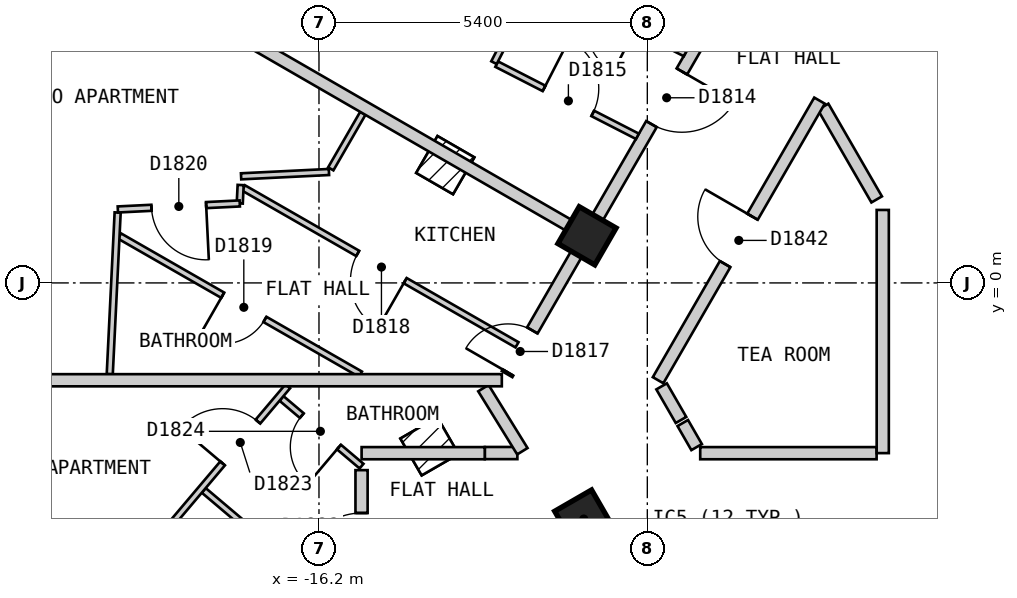
"""IFC4 building model, lengths in metres.
Left out: names, types, materials, properties, quantities, classifications, styles, units other than length and angle.
Written with IfcOpenShell. Run it as: python <this file> out.ifc"""

import sys

from ifc_helpers import new_model, si_unit, direction, frame, frame_2d, origin, origin_2d, place, context, subcontext, project, spatial, polyline, rectangle, outline, extrude, element, fill, save


model = new_model("IFC4")
c1 = context("Model", 3, precision=1e-05, world=origin(), true_north=direction((0.0, 1.0)))
c2 = subcontext(c1, "Body", "Model", "MODEL_VIEW")
j1 = project(units=[si_unit("LENGTHUNIT", "METRE"), si_unit("PLANEANGLEUNIT", "RADIAN")], contexts=[c1])
p1 = place(None, origin())
s1 = spatial("IfcSite", under=j1, at=p1, CompositionType="ELEMENT")
p2 = place(p1, origin())
s2 = spatial("IfcBuilding", under=s1, at=p2, CompositionType="ELEMENT")
p3 = place(p2, frame((0.0, 0.0, 202.8)))
s3 = spatial("IfcBuildingStorey", under=s2, at=p3, CompositionType="ELEMENT", Elevation=202.8)
for number, where, z_axis, x_axis in (
    (1, (-11.845, -3.883, 0.0), (0.0, 0.0, 1.0), (0.5, -0.866, 0.0)),
    (2, (-11.792, 0.775, 0.0), (0.0, 0.0, 1.0), (-0.5, -0.866, 0.0)),
):
    element("IfcColumn", number, at=place(p3, frame(where, z_axis=z_axis, x_axis=x_axis)), inside=s3, PredefinedType="COLUMN", context=c2, shape_type="SweptSolid", body=[
        extrude(rectangle(XDim=0.7, YDim=0.7, at=origin_2d()), origin(), (0.0, 0.0, 1.0), 3.0),
    ])
p4 = place(p3, frame((-12.514, 20.025, 0.0), z_axis=(0.0, 0.0, 1.0), x_axis=(-0.500003656944, -0.866023292436, 0.0)))
e3 = element("IfcWall", 3, at=p4, inside=s3, PredefinedType="SOLIDWALL", context=c2, shape_type="SweptSolid", body=[
    extrude(outline(polyline([(0.0, -0.15), (22.17, -0.15), (22.09, 0.15), (0.08, 0.15), (0.0, -0.15)])), origin(), (0.0, 0.0, 1.0), 2.7),
])
p5 = place(p4, frame((1.191, 0.0, 0.15)))
e4 = element("IfcOpeningElement", 4, at=p5, cuts=e3, PredefinedType="OPENING", context=c2, shape_type="SweptSolid", body=[
    extrude(rectangle(XDim=1.5, YDim=2.1, at=frame_2d((0.75, 1.05))), frame((0.0, 0.16, 0.0), z_axis=(0.0, -1.0, 0.0), x_axis=(1.0, 0.0, 0.0)), (0.0, 0.0, 1.0), 0.32),
])
p6 = place(p4, frame((3.804, 0.0, 0.15)))
e5 = element("IfcOpeningElement", 5, at=p6, cuts=e3, PredefinedType="OPENING", context=c2, shape_type="SweptSolid", body=[
    extrude(rectangle(XDim=1.5, YDim=2.1, at=frame_2d((0.75, 1.05))), frame((0.0, 0.16, 0.0), z_axis=(0.0, -1.0, 0.0), x_axis=(1.0, 0.0, 0.0)), (0.0, 0.0, 1.0), 0.32),
])
p7 = place(p4, frame((6.416, 0.0, 0.15)))
e6 = element("IfcOpeningElement", 6, at=p7, cuts=e3, PredefinedType="OPENING", context=c2, shape_type="SweptSolid", body=[
    extrude(rectangle(XDim=1.5, YDim=2.1, at=frame_2d((0.75, 1.05))), frame((0.0, 0.16, 0.0), z_axis=(0.0, -1.0, 0.0), x_axis=(1.0, 0.0, 0.0)), (0.0, 0.0, 1.0), 0.32),
])
p8 = place(p4, frame((9.029, 0.0, 0.15)))
e7 = element("IfcOpeningElement", 7, at=p8, cuts=e3, PredefinedType="OPENING", context=c2, shape_type="SweptSolid", body=[
    extrude(rectangle(XDim=1.5, YDim=2.1, at=frame_2d((0.75, 1.05))), frame((0.0, 0.16, 0.0), z_axis=(0.0, -1.0, 0.0), x_axis=(1.0, 0.0, 0.0)), (0.0, 0.0, 1.0), 0.32),
])
p9 = place(p4, frame((11.641, 0.0, 0.15)))
e8 = element("IfcOpeningElement", 8, at=p9, cuts=e3, PredefinedType="OPENING", context=c2, shape_type="SweptSolid", body=[
    extrude(rectangle(XDim=1.5, YDim=2.1, at=frame_2d((0.75, 1.05))), frame((0.0, 0.16, 0.0), z_axis=(0.0, -1.0, 0.0), x_axis=(1.0, 0.0, 0.0)), (0.0, 0.0, 1.0), 0.32),
])
p10 = place(p4, frame((14.254, 0.0, 0.15)))
e9 = element("IfcOpeningElement", 9, at=p10, cuts=e3, PredefinedType="OPENING", context=c2, shape_type="SweptSolid", body=[
    extrude(rectangle(XDim=1.5, YDim=2.1, at=frame_2d((0.75, 1.05))), frame((0.0, 0.16, 0.0), z_axis=(0.0, -1.0, 0.0), x_axis=(1.0, 0.0, 0.0)), (0.0, 0.0, 1.0), 0.32),
])
p11 = place(p4, frame((16.866, 0.0, 0.15)))
e10 = element("IfcOpeningElement", 10, at=p11, cuts=e3, PredefinedType="OPENING", context=c2, shape_type="SweptSolid", body=[
    extrude(rectangle(XDim=1.5, YDim=2.1, at=frame_2d((0.75, 1.05))), frame((0.0, 0.16, 0.0), z_axis=(0.0, -1.0, 0.0), x_axis=(1.0, 0.0, 0.0)), (0.0, 0.0, 1.0), 0.32),
])
p12 = place(p4, frame((19.479, 0.0, 0.15)))
e11 = element("IfcOpeningElement", 11, at=p12, cuts=e3, PredefinedType="OPENING", context=c2, shape_type="SweptSolid", body=[
    extrude(rectangle(XDim=1.5, YDim=2.1, at=frame_2d((0.75, 1.05))), frame((0.0, 0.16, 0.0), z_axis=(0.0, -1.0, 0.0), x_axis=(1.0, 0.0, 0.0)), (0.0, 0.0, 1.0), 0.32),
])
p13 = place(p3, frame((-15.652, -21.037, 0.0), z_axis=(0.0, 0.0, 1.0), x_axis=(-0.500074253024, 0.865982529536, 0.0)))
e12 = element("IfcWall", 12, at=p13, inside=s3, PredefinedType="PARAPET", context=c2, shape_type="SweptSolid", body=[
    extrude(outline(polyline([(0.067, -0.125), (20.718, -0.125), (20.784, 0.125), (0.0, 0.125), (0.067, -0.125)])), origin(), (0.0, 0.0, 1.0), 1.6),
])
p14 = place(p3, frame((-26.046, 1.838, 0.0), z_axis=(0.0, 0.0, 1.0), x_axis=(0.500061067893, 0.865990143349, 0.0)))
e13 = element("IfcWall", 13, at=p14, inside=s3, PredefinedType="PARAPET", context=c2, shape_type="SweptSolid", body=[
    extrude(outline(polyline([(0.067, -0.125), (22.796, -0.125), (22.863, 0.125), (0.0, 0.125), (0.067, -0.125)])), origin(), (0.0, 0.0, 1.0), 1.6),
])
p15 = place(p3, frame((-7.909, 2.898, 0.0), z_axis=(0.0, 0.0, 1.0), x_axis=(0.50019444547, -0.865913111531, 0.0)))
e14 = element("IfcWall", 14, at=p15, inside=s3, PredefinedType="PARTITIONING", context=c2, shape_type="SweptSolid", body=[
    extrude(rectangle(XDim=1.761, YDim=0.2, at=frame_2d((0.88, 0.0))), origin(), (0.0, 0.0, 1.0), 2.7),
])
p16 = place(p3, frame((-10.565, -1.701, 0.0), z_axis=(0.0, 0.0, 1.0), x_axis=(0.499512735409, -0.866306543416, 0.0)))
e15 = element("IfcWall", 15, at=p16, inside=s3, PredefinedType="PARTITIONING", context=c2, shape_type="SweptSolid", body=[
    extrude(rectangle(XDim=0.638, YDim=0.2, at=frame_2d((0.319, 0.0))), origin(), (0.0, 0.0, 1.0), 2.7),
])
p17 = place(p3, frame((-10.217, -2.304, 0.0), z_axis=(0.0, 0.0, 1.0), x_axis=(0.499013081552, -0.866594452117, 0.0)))
e16 = element("IfcWall", 16, at=p17, inside=s3, PredefinedType="PARTITIONING", context=c2, shape_type="SweptSolid", body=[
    extrude(rectangle(XDim=0.457, YDim=0.2, at=frame_2d((0.229, 0.0))), origin(), (0.0, 0.0, 1.0), 2.7),
])
p18 = place(p3, frame((-13.472, -2.798, 0.0), z_axis=(0.0, 0.0, 1.0), x_axis=(1.0, 0.0, 0.0)))
e17 = element("IfcWall", 17, at=p18, inside=s3, PredefinedType="PARTITIONING", context=c2, shape_type="SweptSolid", body=[
    extrude(rectangle(XDim=0.535, YDim=0.2, at=frame_2d((0.268, 0.0))), origin(), (0.0, 0.0, 1.0), 2.7),
])
p19 = place(p3, frame((-15.499, -2.8, 0.0), z_axis=(0.0, 0.0, 1.0), x_axis=(1.0, 0.0, 0.0)))
e18 = element("IfcWall", 18, at=p19, inside=s3, PredefinedType="PARTITIONING", context=c2, shape_type="SweptSolid", body=[
    extrude(rectangle(XDim=2.025, YDim=0.2, at=frame_2d((1.012, 0.0))), origin(), (0.0, 0.0, 1.0), 2.7),
])
p20 = place(p3, frame((-9.93, -2.8, 0.0), z_axis=(0.0, 0.0, 1.0), x_axis=(1.0, 0.0, 0.0)))
e19 = element("IfcWall", 19, at=p20, inside=s3, PredefinedType="PARTITIONING", context=c2, shape_type="SweptSolid", body=[
    extrude(rectangle(XDim=2.901, YDim=0.2, at=frame_2d((1.45, 0.0))), origin(), (0.0, 0.0, 1.0), 2.7),
])
p21 = place(p3, frame((-10.623, -1.6, 0.0), z_axis=(0.0, 0.0, 1.0), x_axis=(0.500040865889, 0.866001808567, 0.0)))
e20 = element("IfcWall", 20, at=p21, inside=s3, PredefinedType="PARTITIONING", context=c2, shape_type="SweptSolid", body=[
    extrude(rectangle(XDim=5.31, YDim=0.2, at=frame_2d((2.655, 0.0))), origin(), (0.0, 0.0, 1.0), 2.7),
])
p22 = place(p21, frame((2.205, 0.0, 0.0)))
e21 = element("IfcOpeningElement", 21, at=p22, cuts=e20, PredefinedType="OPENING", context=c2, shape_type="SweptSolid", body=[
    extrude(rectangle(XDim=0.9, YDim=2.1, at=frame_2d((0.45, 1.05))), frame((0.0, 0.11, 0.0), z_axis=(0.0, -1.0, 0.0), x_axis=(1.0, 0.0, 0.0)), (0.0, 0.0, 1.0), 0.22),
])
p23 = place(p3, frame((-13.106, -1.5, 0.0), z_axis=(0.0, 0.0, 1.0), x_axis=(0.500025705601, 0.86601056214, 0.0)))
e22 = element("IfcWall", 22, at=p23, inside=s3, PredefinedType="PARTITIONING", context=c2, shape_type="SweptSolid", body=[
    extrude(rectangle(XDim=7.735, YDim=0.2, at=frame_2d((3.868, 0.0))), origin(), (0.0, 0.0, 1.0), 2.7),
])
p24 = place(p23, frame((4.748, 0.0, 0.0)))
e23 = element("IfcOpeningElement", 23, at=p24, cuts=e22, PredefinedType="OPENING", context=c2, shape_type="SweptSolid", body=[
    extrude(rectangle(XDim=1.0, YDim=2.1, at=frame_2d((0.5, 1.05))), frame((0.0, 0.11, 0.0), z_axis=(0.0, -1.0, 0.0), x_axis=(1.0, 0.0, 0.0)), (0.0, 0.0, 1.0), 0.22),
])
p25 = place(p23, frame((0.03, 0.0, 0.0)))
e24 = element("IfcOpeningElement", 24, at=p25, cuts=e22, PredefinedType="OPENING", context=c2, shape_type="SweptSolid", body=[
    extrude(rectangle(XDim=0.8, YDim=2.1, at=frame_2d((0.4, 1.05))), frame((0.0, 0.11, 0.0), z_axis=(0.0, -1.0, 0.0), x_axis=(1.0, 0.0, 0.0)), (0.0, 0.0, 1.0), 0.22),
])
p26 = place(p3, frame((-6.928, -2.799, 0.0), z_axis=(0.0, 0.0, 1.0), x_axis=(0.0, 1.0, 0.0)))
e25 = element("IfcWall", 25, at=p26, inside=s3, PredefinedType="PARTITIONING", context=c2, shape_type="SweptSolid", body=[
    extrude(rectangle(XDim=3.999, YDim=0.2, at=frame_2d((2.0, 0.0))), origin(), (0.0, 0.0, 1.0), 2.7),
])
p27 = place(p3, frame((-15.5, -6.599, 0.0), z_axis=(0.0, 0.0, 1.0), x_axis=(0.0, 1.0, 0.0)))
e26 = element("IfcWall", 26, at=p27, inside=s3, PredefinedType="PARTITIONING", context=c2, shape_type="SweptSolid", body=[
    extrude(rectangle(XDim=3.52, YDim=0.2, at=frame_2d((1.76, 0.0))), origin(), (0.0, 0.0, 1.0), 2.7),
])
p28 = place(p27, frame((1.815, 0.0, 0.0)))
e27 = element("IfcOpeningElement", 27, at=p28, cuts=e26, PredefinedType="OPENING", context=c2, shape_type="SweptSolid", body=[
    extrude(rectangle(XDim=1.0, YDim=2.1, at=frame_2d((0.5, 1.05))), frame((0.0, 0.11, 0.0), z_axis=(0.0, -1.0, 0.0), x_axis=(1.0, 0.0, 0.0)), (0.0, 0.0, 1.0), 0.22),
])
p29 = place(p3, frame((-12.562, 4.995, 0.0), z_axis=(0.0, 0.0, 1.0), x_axis=(0.889807979554, -0.456335139478, 0.0)))
e28 = element("IfcWall", 28, at=p29, inside=s3, PredefinedType="PARTITIONING", context=c2, shape_type="SweptSolid", body=[
    extrude(rectangle(XDim=2.68, YDim=0.1, at=frame_2d((1.34, 0.0))), origin(), (0.0, 0.0, 1.0), 2.7),
])
p30 = place(p29, frame((0.965, 0.0, 0.0)))
e29 = element("IfcOpeningElement", 29, at=p30, cuts=e28, PredefinedType="OPENING", context=c2, shape_type="SweptSolid", body=[
    extrude(rectangle(XDim=0.8, YDim=2.1, at=frame_2d((0.4, 1.05))), frame((0.0, 0.06, 0.0), z_axis=(0.0, -1.0, 0.0), x_axis=(1.0, 0.0, 0.0)), (0.0, 0.0, 1.0), 0.12),
])
p31 = place(p3, frame((-13.277, 3.598, 0.0), z_axis=(0.0, 0.0, 1.0), x_axis=(0.889780322893, -0.456389063182, 0.0)))
e30 = element("IfcWall", 30, at=p31, inside=s3, PredefinedType="PARTITIONING", context=c2, shape_type="SweptSolid", body=[
    extrude(rectangle(XDim=2.601, YDim=0.1, at=frame_2d((1.3, 0.0))), origin(), (0.0, 0.0, 1.0), 2.7),
])
p32 = place(p31, frame((0.875, 0.0, 0.0)))
e31 = element("IfcOpeningElement", 31, at=p32, cuts=e30, PredefinedType="OPENING", context=c2, shape_type="SweptSolid", body=[
    extrude(rectangle(XDim=0.9, YDim=2.1, at=frame_2d((0.45, 1.05))), frame((0.0, 0.06, 0.0), z_axis=(0.0, -1.0, 0.0), x_axis=(1.0, 0.0, 0.0)), (0.0, 0.0, 1.0), 0.12),
])
p33 = place(p3, frame((-17.441, 1.562, 0.0), z_axis=(0.0, 0.0, 1.0), x_axis=(0.867419073464, -0.497578286293, 0.0)))
e32 = element("IfcWall", 32, at=p33, inside=s3, PredefinedType="PARTITIONING", context=c2, shape_type="SweptSolid", body=[
    extrude(rectangle(XDim=5.185, YDim=0.1, at=frame_2d((2.593, 0.0))), origin(), (0.0, 0.0, 1.0), 2.7),
])
p34 = place(p33, frame((2.165, 0.0, 0.0)))
e33 = element("IfcOpeningElement", 33, at=p34, cuts=e32, PredefinedType="OPENING", context=c2, shape_type="SweptSolid", body=[
    extrude(rectangle(XDim=0.9, YDim=2.1, at=frame_2d((0.45, 1.05))), frame((0.0, 0.06, 0.0), z_axis=(0.0, -1.0, 0.0), x_axis=(1.0, 0.0, 0.0)), (0.0, 0.0, 1.0), 0.12),
])
p35 = place(p3, frame((-19.48, 0.771, 0.0), z_axis=(0.0, 0.0, 1.0), x_axis=(0.86748552317, -0.497462427817, 0.0)))
e34 = element("IfcWall", 34, at=p35, inside=s3, PredefinedType="PARTITIONING", context=c2, shape_type="SweptSolid", body=[
    extrude(rectangle(XDim=4.567, YDim=0.1, at=frame_2d((2.284, 0.0))), origin(), (0.0, 0.0, 1.0), 2.7),
])
p36 = place(p35, frame((1.956, 0.0, 0.0)))
e35 = element("IfcOpeningElement", 35, at=p36, cuts=e34, PredefinedType="OPENING", context=c2, shape_type="SweptSolid", body=[
    extrude(rectangle(XDim=0.8, YDim=2.1, at=frame_2d((0.4, 1.05))), frame((0.0, 0.06, 0.0), z_axis=(0.0, -1.0, 0.0), x_axis=(1.0, 0.0, 0.0)), (0.0, 0.0, 1.0), 0.12),
])
p37 = place(p3, frame((-16.816, -1.9, 0.0), z_axis=(0.0, 0.0, 1.0), x_axis=(0.763509851459, -0.645796180482, 0.0)))
e36 = element("IfcWall", 36, at=p37, inside=s3, PredefinedType="PARTITIONING", context=c2, shape_type="SweptSolid", body=[
    extrude(rectangle(XDim=1.724, YDim=0.1, at=frame_2d((0.862, 0.0))), origin(), (0.0, 0.0, 1.0), 2.7),
])
p38 = place(p37, frame((0.437, 0.0, 0.0)))
e37 = element("IfcOpeningElement", 37, at=p38, cuts=e36, PredefinedType="OPENING", context=c2, shape_type="SweptSolid", body=[
    extrude(rectangle(XDim=0.8, YDim=2.1, at=frame_2d((0.4, 1.05))), frame((0.0, 0.06, 0.0), z_axis=(0.0, -1.0, 0.0), x_axis=(1.0, 0.0, 0.0)), (0.0, 0.0, 1.0), 0.12),
])
p39 = place(p3, frame((-18.095, -3.412, 0.0), z_axis=(0.0, 0.0, 1.0), x_axis=(0.763564811502, -0.645731196889, 0.0)))
e38 = element("IfcWall", 38, at=p39, inside=s3, PredefinedType="PARTITIONING", context=c2, shape_type="SweptSolid", body=[
    extrude(rectangle(XDim=3.267, YDim=0.1, at=frame_2d((1.634, 0.0))), origin(), (0.0, 0.0, 1.0), 2.7),
])
p40 = place(p39, frame((1.224, 0.0, 0.0)))
e39 = element("IfcOpeningElement", 39, at=p40, cuts=e38, PredefinedType="OPENING", context=c2, shape_type="SweptSolid", body=[
    extrude(rectangle(XDim=0.9, YDim=2.1, at=frame_2d((0.45, 1.05))), frame((0.0, 0.06, 0.0), z_axis=(0.0, -1.0, 0.0), x_axis=(1.0, 0.0, 0.0)), (0.0, 0.0, 1.0), 0.12),
])
p41 = place(p3, frame((-19.625, -5.144, 0.0), z_axis=(0.0, 0.0, 1.0), x_axis=(0.645668001073, 0.763618250431, 0.0)))
e40 = element("IfcWall", 40, at=p41, inside=s3, PredefinedType="PARTITIONING", context=c2, shape_type="SweptSolid", body=[
    extrude(rectangle(XDim=4.51, YDim=0.1, at=frame_2d((2.255, 0.0))), origin(), (0.0, 0.0, 1.0), 2.7),
])
p42 = place(p41, frame((2.85, 0.0, 0.0)))
e41 = element("IfcOpeningElement", 41, at=p42, cuts=e40, PredefinedType="OPENING", context=c2, shape_type="SweptSolid", body=[
    extrude(rectangle(XDim=0.9, YDim=2.1, at=frame_2d((0.45, 1.05))), frame((0.0, 0.06, 0.0), z_axis=(0.0, -1.0, 0.0), x_axis=(1.0, 0.0, 0.0)), (0.0, 0.0, 1.0), 0.12),
])
p43 = place(p3, frame((-16.006, 1.876, 0.0), z_axis=(0.0, 0.0, 1.0), x_axis=(0.499949632511, 0.866054481515, 0.0)))
e42 = element("IfcWall", 42, at=p43, inside=s3, PredefinedType="PARTITIONING", context=c2, shape_type="SweptSolid", body=[
    extrude(rectangle(XDim=1.054, YDim=0.1, at=frame_2d((0.527, 0.0))), origin(), (0.0, 0.0, 1.0), 2.7),
])
p44 = place(p3, frame((-13.322, 3.622, 0.0), z_axis=(0.0, 0.0, 1.0), x_axis=(0.456157649007, 0.889898982611, 0.0)))
e43 = element("IfcWall", 43, at=p44, inside=s3, PredefinedType="PARTITIONING", context=c2, shape_type="SweptSolid", body=[
    extrude(rectangle(XDim=3.398, YDim=0.1, at=frame_2d((1.699, 0.0))), origin(), (0.0, 0.0, 1.0), 2.7),
])
p45 = place(p3, frame((-17.503, 1.307, 0.0), z_axis=(0.0, 0.0, 1.0), x_axis=(0.049055201451, 0.99879606888, 0.0)))
e44 = element("IfcWall", 44, at=p45, inside=s3, PredefinedType="PARTITIONING", context=c2, shape_type="SweptSolid", body=[
    extrude(rectangle(XDim=0.303, YDim=0.1, at=frame_2d((0.152, 0.0))), origin(), (0.0, 0.0, 1.0), 2.7),
])
p46 = place(p3, frame((-19.641, -1.5, 0.0), z_axis=(0.0, 0.0, 1.0), x_axis=(0.048898906005, 0.998803732968, 0.0)))
e45 = element("IfcWall", 45, at=p46, inside=s3, PredefinedType="PARTITIONING", context=c2, shape_type="SweptSolid", body=[
    extrude(rectangle(XDim=2.661, YDim=0.1, at=frame_2d((1.331, 0.0))), origin(), (0.0, 0.0, 1.0), 2.7),
])
p47 = place(p3, frame((-19.508, 1.208, 0.0), z_axis=(0.0, 0.0, 1.0), x_axis=(0.998786372978, 0.04925221978, 0.0)))
e46 = element("IfcWall", 46, at=p47, inside=s3, PredefinedType="PARTITIONING", context=c2, shape_type="SweptSolid", body=[
    extrude(rectangle(XDim=2.008, YDim=0.1, at=frame_2d((1.004, 0.0))), origin(), (0.0, 0.0, 1.0), 2.7),
])
p48 = place(p47, frame((0.554, 0.0, 0.0)))
e47 = element("IfcOpeningElement", 47, at=p48, cuts=e46, PredefinedType="OPENING", context=c2, shape_type="SweptSolid", body=[
    extrude(rectangle(XDim=0.9, YDim=2.1, at=frame_2d((0.45, 1.05))), frame((0.0, 0.06, 0.0), z_axis=(0.0, -1.0, 0.0), x_axis=(1.0, 0.0, 0.0)), (0.0, 0.0, 1.0), 0.12),
])
p49 = place(p3, frame((-17.481, 1.753, 0.0), z_axis=(0.0, 0.0, 1.0), x_axis=(0.998793651238, 0.049104401505, 0.0)))
e48 = element("IfcWall", 48, at=p49, inside=s3, PredefinedType="PARTITIONING", context=c2, shape_type="SweptSolid", body=[
    extrude(rectangle(XDim=1.447, YDim=0.1, at=frame_2d((0.723, 0.0))), origin(), (0.0, 0.0, 1.0), 2.7),
])
p50 = place(p3, frame((-20.539, 5.825, 0.0), z_axis=(0.0, 0.0, 1.0), x_axis=(0.866028187226, -0.499995178908, 0.0)))
e49 = element("IfcWall", 49, at=p50, inside=s3, PredefinedType="PARTITIONING", context=c2, shape_type="SweptSolid", body=[
    extrude(rectangle(XDim=9.996, YDim=0.2, at=frame_2d((4.998, 0.0))), origin(), (0.0, 0.0, 1.0), 2.7),
])
p51 = place(p3, frame((-13.496, -1.73, 0.0), z_axis=(0.0, 0.0, 1.0), x_axis=(0.525458799645, -0.850819046493, 0.0)))
e50 = element("IfcWall", 50, at=p51, inside=s3, PredefinedType="PARTITIONING", context=c2, shape_type="SweptSolid", body=[
    extrude(rectangle(XDim=1.22, YDim=0.2, at=frame_2d((0.61, 0.0))), origin(), (0.0, 0.0, 1.0), 2.7),
])
p52 = place(p3, frame((-23.429, -1.601, 0.0), z_axis=(0.0, 0.0, 1.0), x_axis=(0.999999995449, 9.5406191e-05, 0.0)))
e51 = element("IfcWall", 51, at=p52, inside=s3, PredefinedType="PARTITIONING", context=c2, shape_type="SweptSolid", body=[
    extrude(rectangle(XDim=10.236, YDim=0.2, at=frame_2d((5.118, 0.0))), origin(), (0.0, 0.0, 1.0), 2.7),
])
p53 = place(p24, origin())
e52 = element("IfcDoor", 52, at=p53, inside=s3, OperationType="SINGLE_SWING_RIGHT", PredefinedType="DOOR", context=c2, shape_type="SweptSolid", body=[
    extrude(rectangle(XDim=1.0, YDim=2.1, at=frame_2d((0.5, 1.05))), frame((0.0, 0.025, 0.0), z_axis=(0.0, -1.0, 0.0), x_axis=(1.0, 0.0, 0.0)), (0.0, 0.0, 1.0), 0.05),
])
fill(e23, e52)
p54 = place(p32, origin())
e53 = element("IfcDoor", 53, at=p54, inside=s3, OperationType="SINGLE_SWING_LEFT", PredefinedType="DOOR", context=c2, shape_type="SweptSolid", body=[
    extrude(rectangle(XDim=0.9, YDim=2.1, at=frame_2d((0.45, 1.05))), frame((0.0, 0.025, 0.0), z_axis=(0.0, -1.0, 0.0), x_axis=(1.0, 0.0, 0.0)), (0.0, 0.0, 1.0), 0.05),
])
fill(e31, e53)
p55 = place(p25, origin())
e54 = element("IfcDoor", 54, at=p55, inside=s3, OperationType="SINGLE_SWING_LEFT", PredefinedType="DOOR", context=c2, shape_type="SweptSolid", body=[
    extrude(rectangle(XDim=0.8, YDim=2.1, at=frame_2d((0.4, 1.05))), frame((0.0, 0.025, 0.0), z_axis=(0.0, -1.0, 0.0), x_axis=(1.0, 0.0, 0.0)), (0.0, 0.0, 1.0), 0.05),
])
fill(e24, e54)
p56 = place(p34, origin())
e55 = element("IfcDoor", 55, at=p56, inside=s3, OperationType="SINGLE_SWING_RIGHT", PredefinedType="DOOR", context=c2, shape_type="SweptSolid", body=[
    extrude(rectangle(XDim=0.9, YDim=2.1, at=frame_2d((0.45, 1.05))), frame((0.0, 0.025, 0.0), z_axis=(0.0, -1.0, 0.0), x_axis=(1.0, 0.0, 0.0)), (0.0, 0.0, 1.0), 0.05),
])
fill(e33, e55)
p57 = place(p36, origin())
e56 = element("IfcDoor", 56, at=p57, inside=s3, OperationType="SINGLE_SWING_LEFT", PredefinedType="DOOR", context=c2, shape_type="SweptSolid", body=[
    extrude(rectangle(XDim=0.8, YDim=2.1, at=frame_2d((0.4, 1.05))), frame((0.0, 0.025, 0.0), z_axis=(0.0, -1.0, 0.0), x_axis=(1.0, 0.0, 0.0)), (0.0, 0.0, 1.0), 0.05),
])
fill(e35, e56)
p58 = place(p48, origin())
e57 = element("IfcDoor", 57, at=p58, inside=s3, OperationType="SINGLE_SWING_RIGHT", PredefinedType="DOOR", context=c2, shape_type="SweptSolid", body=[
    extrude(rectangle(XDim=0.9, YDim=2.1, at=frame_2d((0.45, 1.05))), frame((0.0, 0.025, 0.0), z_axis=(0.0, -1.0, 0.0), x_axis=(1.0, 0.0, 0.0)), (0.0, 0.0, 1.0), 0.05),
])
fill(e47, e57)
p59 = place(p28, origin())
e58 = element("IfcDoor", 58, at=p59, inside=s3, OperationType="SINGLE_SWING_LEFT", PredefinedType="DOOR", context=c2, shape_type="SweptSolid", body=[
    extrude(rectangle(XDim=1.0, YDim=2.1, at=frame_2d((0.5, 1.05))), frame((0.0, 0.025, 0.0), z_axis=(0.0, -1.0, 0.0), x_axis=(1.0, 0.0, 0.0)), (0.0, 0.0, 1.0), 0.05),
])
fill(e27, e58)
p60 = place(p42, origin())
e59 = element("IfcDoor", 59, at=p60, inside=s3, OperationType="SINGLE_SWING_LEFT", PredefinedType="DOOR", context=c2, shape_type="SweptSolid", body=[
    extrude(rectangle(XDim=0.9, YDim=2.1, at=frame_2d((0.45, 1.05))), frame((0.0, 0.025, 0.0), z_axis=(0.0, -1.0, 0.0), x_axis=(1.0, 0.0, 0.0)), (0.0, 0.0, 1.0), 0.05),
])
fill(e41, e59)
p61 = place(p38, origin())
e60 = element("IfcDoor", 60, at=p61, inside=s3, OperationType="SINGLE_SWING_RIGHT", PredefinedType="DOOR", context=c2, shape_type="SweptSolid", body=[
    extrude(rectangle(XDim=0.8, YDim=2.1, at=frame_2d((0.4, 1.05))), frame((0.0, 0.025, 0.0), z_axis=(0.0, -1.0, 0.0), x_axis=(1.0, 0.0, 0.0)), (0.0, 0.0, 1.0), 0.05),
])
fill(e37, e60)
p62 = place(p22, origin())
e61 = element("IfcDoor", 61, at=p62, inside=s3, OperationType="SINGLE_SWING_RIGHT", PredefinedType="DOOR", context=c2, shape_type="SweptSolid", body=[
    extrude(rectangle(XDim=0.9, YDim=2.1, at=frame_2d((0.45, 1.05))), frame((0.0, 0.025, 0.0), z_axis=(0.0, -1.0, 0.0), x_axis=(1.0, 0.0, 0.0)), (0.0, 0.0, 1.0), 0.05),
])
fill(e21, e61)
save(model, sys.argv[1])
